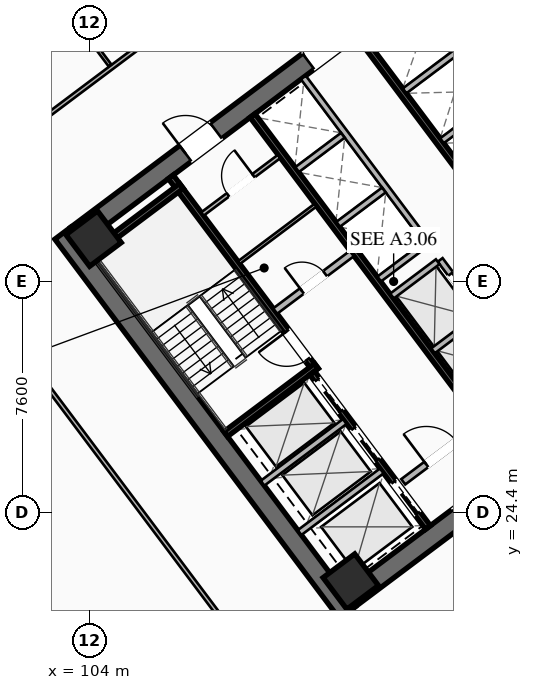
"""IFC4 building model, lengths in metres.
Left out: names, types, materials, properties, quantities, classifications, styles, units other than length and angle.
Written with IfcOpenShell. Run it as: python <this file> out.ifc"""

import sys

from ifc_helpers import new_model, si_unit, direction, frame, frame_2d, origin, origin_2d, place, context, subcontext, project, spatial, rectangle, hollow_rectangle, extrude, element, fill, save


model = new_model("IFC4")
c1 = context("Model", 3, precision=1e-05, world=origin(), true_north=direction((0.0, 1.0)))
c2 = subcontext(c1, "Body", "Model", "MODEL_VIEW")
j1 = project(units=[si_unit("LENGTHUNIT", "METRE"), si_unit("PLANEANGLEUNIT", "RADIAN")], contexts=[c1])
p1 = place(None, origin())
s1 = spatial("IfcSite", under=j1, at=p1, CompositionType="ELEMENT")
p2 = place(p1, origin())
s2 = spatial("IfcBuilding", under=s1, at=p2, CompositionType="ELEMENT")
p3 = place(p2, frame((0.0, 0.0, 84.95)))
s3 = spatial("IfcBuildingStorey", under=s2, at=p3, CompositionType="ELEMENT", Elevation=84.95)
for number, where, z_axis, x_axis in (
    (1, (112.476, 21.107, 0.0), (0.0, 0.0, 1.0), (-0.6, 0.8, 0.0)),
    (2, (115.524, 42.893, 0.0), (0.0, 0.0, 1.0), (0.6, -0.8, 0.0)),
):
    element("IfcWall", number, at=place(p3, frame(where, z_axis=z_axis, x_axis=x_axis)), inside=s3, PredefinedType="SHEAR", context=c2, shape_type="SweptSolid", body=[
        extrude(rectangle(XDim=15.6, YDim=0.65, at=frame_2d((7.8, 0.0))), origin(), (0.0, 0.0, 1.0), 3.55),
    ])
p4 = place(p3, frame((124.429, 30.478, 0.0), z_axis=(0.0, 0.0, 1.0), x_axis=(-0.799998028465, -0.600002628705, 0.0)))
e3 = element("IfcWall", 3, at=p4, inside=s3, PredefinedType="SHEAR", context=c2, shape_type="SweptSolid", body=[
    extrude(rectangle(XDim=14.86, YDim=0.65, at=frame_2d((7.43, 0.0))), origin(), (0.0, 0.0, 1.0), 3.55),
])
p5 = place(p4, frame((9.13, 0.0, 0.0)))
e4 = element("IfcOpeningElement", 4, at=p5, cuts=e3, PredefinedType="OPENING", context=c2, shape_type="SweptSolid", body=[
    extrude(rectangle(XDim=1.25, YDim=2.25, at=frame_2d((0.625, 1.125))), frame((0.0, 0.335, 0.0), z_axis=(0.0, -1.0, 0.0), x_axis=(1.0, 0.0, 0.0)), (0.0, 0.0, 1.0), 0.67),
])
p6 = place(p4, frame((4.08, 0.0, 0.0)))
e5 = element("IfcOpeningElement", 5, at=p6, cuts=e3, PredefinedType="OPENING", context=c2, shape_type="SweptSolid", body=[
    extrude(rectangle(XDim=1.25, YDim=2.25, at=frame_2d((0.625, 1.125))), frame((0.0, 0.335, 0.0), z_axis=(0.0, -1.0, 0.0), x_axis=(1.0, 0.0, 0.0)), (0.0, 0.0, 1.0), 0.67),
])
p7 = place(p3, frame((103.571, 33.522, 0.0), z_axis=(0.0, 0.0, 1.0), x_axis=(0.799998028465, 0.600002628705, 0.0)))
e6 = element("IfcWall", 6, at=p7, inside=s3, PredefinedType="SHEAR", context=c2, shape_type="SweptSolid", body=[
    extrude(rectangle(XDim=14.86, YDim=0.65, at=frame_2d((7.43, 0.0))), origin(), (0.0, 0.0, 1.0), 3.55),
])
p8 = place(p7, frame((4.48, 0.0, 0.0)))
e7 = element("IfcOpeningElement", 7, at=p8, cuts=e6, PredefinedType="OPENING", context=c2, shape_type="SweptSolid", body=[
    extrude(rectangle(XDim=1.25, YDim=2.25, at=frame_2d((0.625, 1.125))), frame((0.0, 0.335, 0.0), z_axis=(0.0, -1.0, 0.0), x_axis=(1.0, 0.0, 0.0)), (0.0, 0.0, 1.0), 0.67),
])
p9 = place(p7, frame((9.53, 0.0, 0.0)))
e8 = element("IfcOpeningElement", 8, at=p9, cuts=e6, PredefinedType="OPENING", context=c2, shape_type="SweptSolid", body=[
    extrude(rectangle(XDim=1.25, YDim=2.25, at=frame_2d((0.625, 1.125))), frame((0.0, 0.335, 0.0), z_axis=(0.0, -1.0, 0.0), x_axis=(1.0, 0.0, 0.0)), (0.0, 0.0, 1.0), 0.67),
])
for number, where, z_axis, x_axis in (
    (9, (112.59, 22.13, 0.0), (0.0, 0.0, 1.0), (0.8, 0.6, 0.0)),
    (10, (104.13, 33.41, 0.0), (0.0, 0.0, 1.0), (0.8, 0.6, 0.0)),
):
    element("IfcColumn", number, at=place(p3, frame(where, z_axis=z_axis, x_axis=x_axis)), inside=s3, PredefinedType="COLUMN", context=c2, shape_type="SweptSolid", body=[
        extrude(hollow_rectangle(XDim=1.3, YDim=1.3, WallThickness=0.05, at=origin_2d()), origin(), (0.0, 0.0, 1.0), 3.35),
    ])
p10 = place(p3, frame((111.44, 29.08, 0.0), z_axis=(0.0, 0.0, 1.0), x_axis=(-0.600009827119, 0.799992629566, 0.0)))
e11 = element("IfcWall", 11, at=p10, inside=s3, PredefinedType="SHEAR", context=c2, shape_type="SweptSolid", body=[
    extrude(rectangle(XDim=7.95, YDim=0.2, at=frame_2d((3.975, 0.0))), origin(), (0.0, 0.0, 1.0), 3.35),
])
p11 = place(p10, frame((0.45, 0.0, 0.0)))
e12 = element("IfcOpeningElement", 12, at=p11, cuts=e11, PredefinedType="OPENING", context=c2, shape_type="SweptSolid", body=[
    extrude(rectangle(XDim=1.15, YDim=2.2, at=frame_2d((0.575, 1.1))), frame((0.0, 0.11, 0.0), z_axis=(0.0, -1.0, 0.0), x_axis=(1.0, 0.0, 0.0)), (0.0, 0.0, 1.0), 0.22),
])
for number, where, z_axis, x_axis in (
    (13, (108.476, 26.982, 0.0), (0.0, 0.0, 1.0), (0.8, 0.6, 0.0)),
    (14, (104.036, 32.902, 0.0), (0.0, 0.0, 1.0), (0.8, 0.6, 0.0)),
):
    element("IfcWall", number, at=place(p3, frame(where, z_axis=z_axis, x_axis=x_axis)), inside=s3, PredefinedType="SHEAR", context=c2, shape_type="SweptSolid", body=[
        extrude(rectangle(XDim=3.73, YDim=0.2, at=frame_2d((1.865, 0.0))), origin(), (0.0, 0.0, 1.0), 3.35),
    ])
p12 = place(p3, frame((117.938, 26.016, 0.0), z_axis=(0.0, 0.0, 1.0), x_axis=(-0.600005463273, 0.799995902516, 0.0)))
e15 = element("IfcWall", 15, at=p12, inside=s3, PredefinedType="SHEAR", context=c2, shape_type="SweptSolid", body=[
    extrude(rectangle(XDim=14.3, YDim=0.2, at=frame_2d((7.15, 0.0))), origin(), (0.0, 0.0, 1.0), 3.35),
])
p13 = place(p3, frame((110.104, 31.028, 0.0), z_axis=(0.0, 0.0, 1.0), x_axis=(0.800018601094, 0.59997519774, 0.0)))
e16 = element("IfcWall", 16, at=p13, inside=s3, PredefinedType="SOLIDWALL", context=c2, shape_type="SweptSolid", body=[
    extrude(rectangle(XDim=3.15, YDim=0.22, at=frame_2d((1.575, 0.0))), origin(), (0.0, 0.0, 1.0), 2.703),
])
p14 = place(p13, frame((1.1, 0.0, 0.0)))
e17 = element("IfcOpeningElement", 17, at=p14, cuts=e16, PredefinedType="OPENING", context=c2, shape_type="SweptSolid", body=[
    extrude(rectangle(XDim=0.95, YDim=2.05, at=frame_2d((0.475, 1.025))), frame((0.0, 0.12, 0.0), z_axis=(0.0, -1.0, 0.0), x_axis=(1.0, 0.0, 0.0)), (0.0, 0.0, 1.0), 0.24),
])
p15 = place(p3, frame((114.316, 25.412, 0.0), z_axis=(0.0, 0.0, 1.0), x_axis=(0.800018601094, 0.59997519774, 0.0)))
e18 = element("IfcWall", 18, at=p15, inside=s3, PredefinedType="SOLIDWALL", context=c2, shape_type="SweptSolid", body=[
    extrude(rectangle(XDim=3.15, YDim=0.22, at=frame_2d((1.575, 0.0))), origin(), (0.0, 0.0, 1.0), 2.703),
])
p16 = place(p15, frame((0.95, 0.0, 0.0)))
e19 = element("IfcOpeningElement", 19, at=p16, cuts=e18, PredefinedType="OPENING", context=c2, shape_type="SweptSolid", body=[
    extrude(rectangle(XDim=1.25, YDim=2.25, at=frame_2d((0.625, 1.125))), frame((0.0, 0.12, 0.0), z_axis=(0.0, -1.0, 0.0), x_axis=(1.0, 0.0, 0.0)), (0.0, 0.0, 1.0), 0.24),
])
p17 = place(p3, frame((115.13, 23.91, 0.0), z_axis=(0.0, 0.0, 1.0), x_axis=(-0.599975393228, 0.800018454488, 0.0)))
e20 = element("IfcWall", 20, at=p17, inside=s3, PredefinedType="SHEAR", context=c2, shape_type="SweptSolid", body=[
    extrude(rectangle(XDim=6.35, YDim=0.2, at=frame_2d((3.175, 0.0))), origin(), (0.0, 0.0, 1.0), 3.35),
])
p18 = place(p17, frame((4.775, 0.0, 0.0)))
e21 = element("IfcOpeningElement", 21, at=p18, cuts=e20, PredefinedType="OPENING", context=c2, shape_type="SweptSolid", body=[
    extrude(rectangle(XDim=1.3, YDim=2.25, at=frame_2d((0.65, 1.125))), frame((0.0, 0.11, 0.0), z_axis=(0.0, -1.0, 0.0), x_axis=(1.0, 0.0, 0.0)), (0.0, 0.0, 1.0), 0.22),
])
p19 = place(p17, frame((2.775, 0.0, 0.0)))
e22 = element("IfcOpeningElement", 22, at=p19, cuts=e20, PredefinedType="OPENING", context=c2, shape_type="SweptSolid", body=[
    extrude(rectangle(XDim=1.3, YDim=2.25, at=frame_2d((0.65, 1.125))), frame((0.0, 0.11, 0.0), z_axis=(0.0, -1.0, 0.0), x_axis=(1.0, 0.0, 0.0)), (0.0, 0.0, 1.0), 0.22),
])
p20 = place(p17, frame((0.575, 0.0, 0.0)))
e23 = element("IfcOpeningElement", 23, at=p20, cuts=e20, PredefinedType="OPENING", context=c2, shape_type="SweptSolid", body=[
    extrude(rectangle(XDim=1.3, YDim=2.25, at=frame_2d((0.65, 1.125))), frame((0.0, 0.11, 0.0), z_axis=(0.0, -1.0, 0.0), x_axis=(1.0, 0.0, 0.0)), (0.0, 0.0, 1.0), 0.22),
])
for number, where, z_axis, x_axis in (
    (24, (110.906, 23.742, 0.0), (0.0, 0.0, 1.0), (0.8, 0.6, 0.0)),
    (25, (109.688, 25.366, 0.0), (0.0, 0.0, 1.0), (0.8, 0.6, 0.0)),
):
    element("IfcWall", number, at=place(p3, frame(where, z_axis=z_axis, x_axis=x_axis)), inside=s3, PredefinedType="SOLIDWALL", context=c2, shape_type="SweptSolid", body=[
        extrude(rectangle(XDim=3.38, YDim=0.2, at=frame_2d((1.69, 0.0))), origin(), (0.0, 0.0, 1.0), 3.35),
    ])
p21 = place(p3, frame((112.87, 40.09, 0.0), z_axis=(0.0, 0.0, 1.0), x_axis=(0.599975393228, -0.800018454488, 0.0)))
e26 = element("IfcWall", 26, at=p21, inside=s3, PredefinedType="SHEAR", context=c2, shape_type="SweptSolid", body=[
    extrude(rectangle(XDim=6.35, YDim=0.2, at=frame_2d((3.175, 0.0))), origin(), (0.0, 0.0, 1.0), 3.35),
])
for number, where, z_axis, x_axis in (
    (27, (115.59, 36.63, 0.0), (0.0, 0.0, 1.0), (0.8, 0.6, 0.0)),
    (28, (114.36, 38.27, 0.0), (0.0, 0.0, 1.0), (0.8, 0.6, 0.0)),
):
    element("IfcWall", number, at=place(p3, frame(where, z_axis=z_axis, x_axis=x_axis)), inside=s3, PredefinedType="SOLIDWALL", context=c2, shape_type="SweptSolid", body=[
        extrude(rectangle(XDim=3.38, YDim=0.2, at=frame_2d((1.69, 0.0))), origin(), (0.0, 0.0, 1.0), 3.35),
    ])
p22 = place(p3, frame((107.71, 34.22, 0.0), z_axis=(0.0, 0.0, 1.0), x_axis=(0.799981399002, 0.60002480053, 0.0)))
e29 = element("IfcWall", 29, at=p22, inside=s3, PredefinedType="PARTITIONING", context=c2, shape_type="SweptSolid", body=[
    extrude(rectangle(XDim=3.15, YDim=0.135, at=frame_2d((1.575, 0.0))), origin(), (0.0, 0.0, 1.0), 2.703),
])
p23 = place(p22, frame((1.05, 0.0, 0.0)))
e30 = element("IfcOpeningElement", 30, at=p23, cuts=e29, PredefinedType="OPENING", context=c2, shape_type="SweptSolid", body=[
    extrude(rectangle(XDim=1.05, YDim=2.2, at=frame_2d((0.525, 1.1))), frame((0.0, 0.077, 0.0), z_axis=(0.0, -1.0, 0.0), x_axis=(1.0, 0.0, 0.0)), (0.0, 0.0, 1.0), 0.155),
])
p24 = place(p3, frame((108.91, 32.62, 0.0), z_axis=(0.0, 0.0, 1.0), x_axis=(0.800018601094, 0.59997519774, 0.0)))
e31 = element("IfcWall", 31, at=p24, inside=s3, PredefinedType="PARTITIONING", context=c2, shape_type="SweptSolid", body=[
    extrude(rectangle(XDim=3.15, YDim=0.11, at=frame_2d((1.575, 0.0))), origin(), (0.0, 0.0, 1.0), 2.703),
])
p25 = place(p3, frame((119.61, 27.27, 0.0), z_axis=(0.0, 0.0, 1.0), x_axis=(-0.600011488909, 0.79999138319, 0.0)))
e32 = element("IfcWall", 32, at=p25, inside=s3, PredefinedType="SOLIDWALL", context=c2, shape_type="SweptSolid", body=[
    extrude(rectangle(XDim=6.8, YDim=0.2, at=frame_2d((3.4, 0.0))), origin(), (0.0, 0.0, 1.0), 3.35),
])
p26 = place(p25, frame((0.625, 0.0, 0.0)))
e33 = element("IfcOpeningElement", 33, at=p26, cuts=e32, PredefinedType="OPENING", context=c2, shape_type="SweptSolid", body=[
    extrude(rectangle(XDim=1.1, YDim=2.2, at=frame_2d((0.55, 1.1))), frame((0.0, 0.11, 0.0), z_axis=(0.0, -1.0, 0.0), x_axis=(1.0, 0.0, 0.0)), (0.0, 0.0, 1.0), 0.22),
])
p27 = place(p25, frame((2.875, 0.0, 0.0)))
e34 = element("IfcOpeningElement", 34, at=p27, cuts=e32, PredefinedType="OPENING", context=c2, shape_type="SweptSolid", body=[
    extrude(rectangle(XDim=1.1, YDim=2.2, at=frame_2d((0.55, 1.1))), frame((0.0, 0.11, 0.0), z_axis=(0.0, -1.0, 0.0), x_axis=(1.0, 0.0, 0.0)), (0.0, 0.0, 1.0), 0.22),
])
p28 = place(p25, frame((5.125, 0.0, 0.0)))
e35 = element("IfcOpeningElement", 35, at=p28, cuts=e32, PredefinedType="OPENING", context=c2, shape_type="SweptSolid", body=[
    extrude(rectangle(XDim=1.1, YDim=2.2, at=frame_2d((0.55, 1.1))), frame((0.0, 0.11, 0.0), z_axis=(0.0, -1.0, 0.0), x_axis=(1.0, 0.0, 0.0)), (0.0, 0.0, 1.0), 0.22),
])
p29 = place(p3, frame((115.296, 29.722, 0.0), z_axis=(0.0, 0.0, 1.0), x_axis=(0.799984418148, 0.600020775241, 0.0)))
e36 = element("IfcWall", 36, at=p29, inside=s3, PredefinedType="SOLIDWALL", context=c2, shape_type="SweptSolid", body=[
    extrude(rectangle(XDim=1.88, YDim=0.2, at=frame_2d((0.94, 0.0))), origin(), (0.0, 0.0, 1.0), 3.35),
])
p30 = place(p3, frame((113.946, 31.522, 0.0), z_axis=(0.0, 0.0, 1.0), x_axis=(0.8, 0.6, 0.0)))
e37 = element("IfcWall", 37, at=p30, inside=s3, PredefinedType="SOLIDWALL", context=c2, shape_type="SweptSolid", body=[
    extrude(rectangle(XDim=1.88, YDim=0.2, at=frame_2d((0.94, 0.0))), origin(), (0.0, 0.0, 1.0), 3.35),
])
p31 = place(p3, frame((115.11, 33.27, 0.0), z_axis=(0.0, 0.0, 1.0), x_axis=(-0.600011488909, 0.79999138319, 0.0)))
e38 = element("IfcWall", 38, at=p31, inside=s3, PredefinedType="SOLIDWALL", context=c2, shape_type="SweptSolid", body=[
    extrude(rectangle(XDim=6.8, YDim=0.2, at=frame_2d((3.4, 0.0))), origin(), (0.0, 0.0, 1.0), 3.35),
])
p32 = place(p3, frame((113.526, 32.082, 0.0), z_axis=(0.0, 0.0, 1.0), x_axis=(0.800046745961, 0.599937666993, 0.0)))
e39 = element("IfcWall", 39, at=p32, inside=s3, PredefinedType="SOLIDWALL", context=c2, shape_type="SweptSolid", body=[
    extrude(rectangle(XDim=1.88, YDim=0.2, at=frame_2d((0.94, 0.0))), origin(), (0.0, 0.0, 1.0), 3.35),
])
p33 = place(p3, frame((112.176, 33.882, 0.0), z_axis=(0.0, 0.0, 1.0), x_axis=(0.8, 0.6, 0.0)))
e40 = element("IfcWall", 40, at=p33, inside=s3, PredefinedType="SOLIDWALL", context=c2, shape_type="SweptSolid", body=[
    extrude(rectangle(XDim=1.88, YDim=0.2, at=frame_2d((0.94, 0.0))), origin(), (0.0, 0.0, 1.0), 3.35),
])
p34 = place(p3, frame((110.826, 35.682, 0.0), z_axis=(0.0, 0.0, 1.0), x_axis=(0.799984418148, 0.600020775241, 0.0)))
e41 = element("IfcWall", 41, at=p34, inside=s3, PredefinedType="SOLIDWALL", context=c2, shape_type="SweptSolid", body=[
    extrude(rectangle(XDim=1.88, YDim=0.2, at=frame_2d((0.94, 0.0))), origin(), (0.0, 0.0, 1.0), 3.35),
])
p35 = place(p3, frame((98.336, 34.252, 0.0), z_axis=(0.0, 0.0, 1.0), x_axis=(0.8, 0.6, 0.0)))
e42 = element("IfcWall", 42, at=p35, inside=s3, PredefinedType="PARTITIONING", context=c2, shape_type="SweptSolid", body=[
    extrude(rectangle(XDim=28.23, YDim=0.135, at=frame_2d((14.115, 0.0))), origin(), (0.0, 0.0, 1.0), 2.703),
])
p36 = place(p35, frame((0.3, 0.0, 0.0)))
e43 = element("IfcOpeningElement", 43, at=p36, cuts=e42, PredefinedType="OPENING", context=c2, shape_type="SweptSolid", body=[
    extrude(rectangle(XDim=0.95, YDim=2.05, at=frame_2d((0.475, 1.025))), frame((0.0, 0.077, 0.0), z_axis=(0.0, -1.0, 0.0), x_axis=(1.0, 0.0, 0.0)), (0.0, 0.0, 1.0), 0.155),
])
p37 = place(p35, frame((10.953, 0.0, 0.0)))
e44 = element("IfcOpeningElement", 44, at=p37, cuts=e42, PredefinedType="OPENING", context=c2, shape_type="SweptSolid", body=[
    extrude(rectangle(XDim=0.95, YDim=2.05, at=frame_2d((0.475, 1.025))), frame((0.0, 0.077, 0.0), z_axis=(0.0, -1.0, 0.0), x_axis=(1.0, 0.0, 0.0)), (0.0, 0.0, 1.0), 0.155),
])
p38 = place(p35, frame((14.758, 0.0, 0.0)))
e45 = element("IfcOpeningElement", 45, at=p38, cuts=e42, PredefinedType="OPENING", context=c2, shape_type="SweptSolid", body=[
    extrude(rectangle(XDim=0.95, YDim=2.05, at=frame_2d((0.475, 1.025))), frame((0.0, 0.077, 0.0), z_axis=(0.0, -1.0, 0.0), x_axis=(1.0, 0.0, 0.0)), (0.0, 0.0, 1.0), 0.155),
])
p39 = place(p35, frame((26.98, 0.0, 0.0)))
e46 = element("IfcOpeningElement", 46, at=p39, cuts=e42, PredefinedType="OPENING", context=c2, shape_type="SweptSolid", body=[
    extrude(rectangle(XDim=0.95, YDim=2.05, at=frame_2d((0.475, 1.025))), frame((0.0, 0.077, 0.0), z_axis=(0.0, -1.0, 0.0), x_axis=(1.0, 0.0, 0.0)), (0.0, 0.0, 1.0), 0.155),
])
p40 = place(p3, frame((104.672, 39.104, 0.0), z_axis=(0.0, 0.0, 1.0), x_axis=(-0.60001816845, 0.79998637334, 0.0)))
e47 = element("IfcWall", 47, at=p40, inside=s3, PredefinedType="PARTITIONING", context=c2, shape_type="SweptSolid", body=[
    extrude(rectangle(XDim=8.6, YDim=0.11, at=frame_2d((4.3, 0.0))), origin(), (0.0, 0.0, 1.0), 2.703),
])
p41 = place(p3, frame((134.18, 33.51, 0.0), z_axis=(0.0, 0.0, 1.0), x_axis=(-0.8, -0.6, 0.0)))
e48 = element("IfcWall", 48, at=p41, inside=s3, PredefinedType="PARTITIONING", context=c2, shape_type="SweptSolid", body=[
    extrude(rectangle(XDim=28.23, YDim=0.135, at=frame_2d((14.115, 0.0))), origin(), (0.0, 0.0, 1.0), 2.703),
])
p42 = place(p41, frame((26.9, 0.0, 0.0)))
e49 = element("IfcOpeningElement", 49, at=p42, cuts=e48, PredefinedType="OPENING", context=c2, shape_type="SweptSolid", body=[
    extrude(rectangle(XDim=0.95, YDim=2.05, at=frame_2d((0.475, 1.025))), frame((0.0, 0.077, 0.0), z_axis=(0.0, -1.0, 0.0), x_axis=(1.0, 0.0, 0.0)), (0.0, 0.0, 1.0), 0.155),
])
p43 = place(p41, frame((16.368, 0.0, 0.0)))
e50 = element("IfcOpeningElement", 50, at=p43, cuts=e48, PredefinedType="OPENING", context=c2, shape_type="SweptSolid", body=[
    extrude(rectangle(XDim=0.95, YDim=2.05, at=frame_2d((0.475, 1.025))), frame((0.0, 0.077, 0.0), z_axis=(0.0, -1.0, 0.0), x_axis=(1.0, 0.0, 0.0)), (0.0, 0.0, 1.0), 0.155),
])
p44 = place(p41, frame((0.38, 0.0, 0.0)))
e51 = element("IfcOpeningElement", 51, at=p44, cuts=e48, PredefinedType="OPENING", context=c2, shape_type="SweptSolid", body=[
    extrude(rectangle(XDim=0.95, YDim=2.05, at=frame_2d((0.475, 1.025))), frame((0.0, 0.077, 0.0), z_axis=(0.0, -1.0, 0.0), x_axis=(1.0, 0.0, 0.0)), (0.0, 0.0, 1.0), 0.155),
])
p45 = place(p3, frame((111.548, 16.636, 0.0), z_axis=(0.0, 0.0, 1.0), x_axis=(-0.600001780419, 0.799998664682, 0.0)))
e52 = element("IfcWall", 52, at=p45, inside=s3, PredefinedType="PARTITIONING", context=c2, shape_type="SweptSolid", body=[
    extrude(rectangle(XDim=21.94, YDim=0.135, at=frame_2d((10.97, 0.0))), origin(), (0.0, 0.0, 1.0), 2.703),
])
p46 = place(p45, frame((20.69, 0.0, 0.0)))
e53 = element("IfcOpeningElement", 53, at=p46, cuts=e52, PredefinedType="OPENING", context=c2, shape_type="SweptSolid", body=[
    extrude(rectangle(XDim=0.95, YDim=2.05, at=frame_2d((0.475, 1.025))), frame((0.0, 0.077, 0.0), z_axis=(0.0, -1.0, 0.0), x_axis=(1.0, 0.0, 0.0)), (0.0, 0.0, 1.0), 0.155),
])
p47 = place(p8, origin())
e54 = element("IfcDoor", 54, at=p47, inside=s3, OperationType="SINGLE_SWING_LEFT", PredefinedType="DOOR", context=c2, shape_type="SweptSolid", body=[
    extrude(rectangle(XDim=1.25, YDim=2.25, at=frame_2d((0.625, 1.125))), frame((0.0, 0.025, 0.0), z_axis=(0.0, -1.0, 0.0), x_axis=(1.0, 0.0, 0.0)), (0.0, 0.0, 1.0), 0.05),
])
fill(e7, e54)
p48 = place(p9, origin())
e55 = element("IfcDoor", 55, at=p48, inside=s3, OperationType="SINGLE_SWING_RIGHT", PredefinedType="DOOR", context=c2, shape_type="SweptSolid", body=[
    extrude(rectangle(XDim=1.25, YDim=2.25, at=frame_2d((0.625, 1.125))), frame((0.0, 0.025, 0.0), z_axis=(0.0, -1.0, 0.0), x_axis=(1.0, 0.0, 0.0)), (0.0, 0.0, 1.0), 0.05),
])
fill(e8, e55)
p49 = place(p11, origin())
e56 = element("IfcDoor", 56, at=p49, inside=s3, OperationType="SINGLE_SWING_RIGHT", PredefinedType="DOOR", context=c2, shape_type="SweptSolid", body=[
    extrude(rectangle(XDim=1.15, YDim=2.2, at=frame_2d((0.575, 1.1))), frame((0.0, 0.025, 0.0), z_axis=(0.0, -1.0, 0.0), x_axis=(1.0, 0.0, 0.0)), (0.0, 0.0, 1.0), 0.05),
])
fill(e12, e56)
p50 = place(p16, origin())
e57 = element("IfcDoor", 57, at=p50, inside=s3, OperationType="SINGLE_SWING_LEFT", PredefinedType="DOOR", context=c2, shape_type="SweptSolid", body=[
    extrude(rectangle(XDim=1.25, YDim=2.25, at=frame_2d((0.625, 1.125))), frame((0.0, 0.025, 0.0), z_axis=(0.0, -1.0, 0.0), x_axis=(1.0, 0.0, 0.0)), (0.0, 0.0, 1.0), 0.05),
])
fill(e19, e57)
p51 = place(p23, origin())
e58 = element("IfcDoor", 58, at=p51, inside=s3, OperationType="SINGLE_SWING_RIGHT", PredefinedType="DOOR", context=c2, shape_type="SweptSolid", body=[
    extrude(rectangle(XDim=1.05, YDim=2.2, at=frame_2d((0.525, 1.1))), frame((0.0, 0.025, 0.0), z_axis=(0.0, -1.0, 0.0), x_axis=(1.0, 0.0, 0.0)), (0.0, 0.0, 1.0), 0.05),
])
fill(e30, e58)
p52 = place(p14, origin())
e59 = element("IfcDoor", 59, at=p52, inside=s3, OperationType="SINGLE_SWING_LEFT", PredefinedType="DOOR", context=c2, shape_type="SweptSolid", body=[
    extrude(rectangle(XDim=0.95, YDim=2.05, at=frame_2d((0.475, 1.025))), frame((0.0, 0.025, 0.0), z_axis=(0.0, -1.0, 0.0), x_axis=(1.0, 0.0, 0.0)), (0.0, 0.0, 1.0), 0.05),
])
fill(e17, e59)
p53 = place(p18, origin())
e60 = element("IfcDoor", 60, at=p53, inside=s3, OperationType="SLIDING_TO_LEFT", PredefinedType="DOOR", context=c2, shape_type="SweptSolid", body=[
    extrude(rectangle(XDim=1.3, YDim=2.25, at=frame_2d((0.65, 1.125))), frame((0.0, 0.025, 0.0), z_axis=(0.0, -1.0, 0.0), x_axis=(1.0, 0.0, 0.0)), (0.0, 0.0, 1.0), 0.05),
])
fill(e21, e60)
p54 = place(p19, origin())
e61 = element("IfcDoor", 61, at=p54, inside=s3, OperationType="SLIDING_TO_LEFT", PredefinedType="DOOR", context=c2, shape_type="SweptSolid", body=[
    extrude(rectangle(XDim=1.3, YDim=2.25, at=frame_2d((0.65, 1.125))), frame((0.0, 0.025, 0.0), z_axis=(0.0, -1.0, 0.0), x_axis=(1.0, 0.0, 0.0)), (0.0, 0.0, 1.0), 0.05),
])
fill(e22, e61)
p55 = place(p20, origin())
e62 = element("IfcDoor", 62, at=p55, inside=s3, OperationType="SLIDING_TO_LEFT", PredefinedType="DOOR", context=c2, shape_type="SweptSolid", body=[
    extrude(rectangle(XDim=1.3, YDim=2.25, at=frame_2d((0.65, 1.125))), frame((0.0, 0.025, 0.0), z_axis=(0.0, -1.0, 0.0), x_axis=(1.0, 0.0, 0.0)), (0.0, 0.0, 1.0), 0.05),
])
fill(e23, e62)
p56 = place(p28, origin())
e63 = element("IfcDoor", 63, at=p56, inside=s3, OperationType="SLIDING_TO_LEFT", PredefinedType="DOOR", context=c2, shape_type="SweptSolid", body=[
    extrude(rectangle(XDim=1.1, YDim=2.2, at=frame_2d((0.55, 1.1))), frame((0.0, 0.025, 0.0), z_axis=(0.0, -1.0, 0.0), x_axis=(1.0, 0.0, 0.0)), (0.0, 0.0, 1.0), 0.05),
])
fill(e35, e63)
save(model, sys.argv[1])
